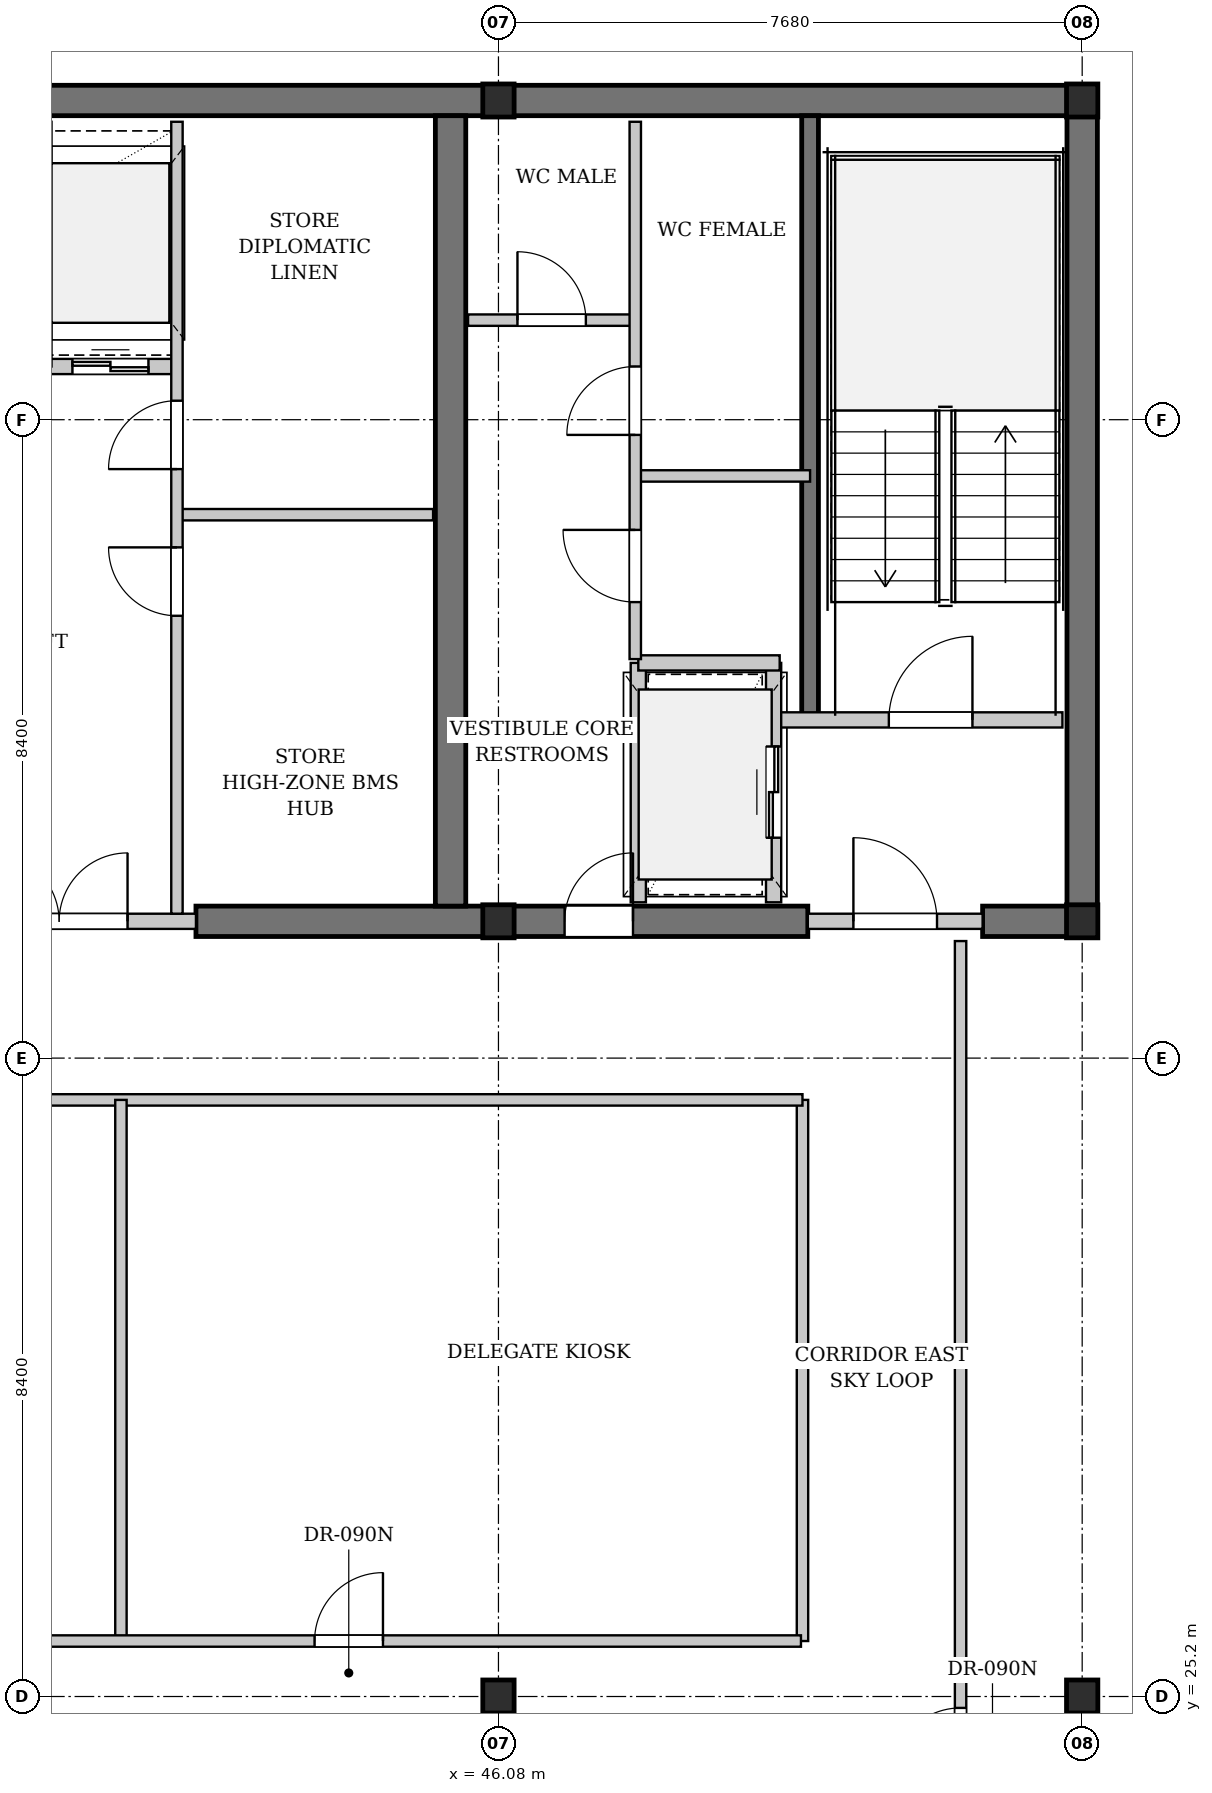
"""IFC4 building model, lengths in metres.
Left out: names, types, materials, properties, quantities, classifications, styles, units other than length and angle.
Written with IfcOpenShell. Run it as: python <this file> out.ifc"""

import sys

from ifc_helpers import new_model, si_unit, direction, frame, frame_2d, origin, origin_2d, place, context, subcontext, project, spatial, rectangle, i_section, extrude, element, fill, save


model = new_model("IFC4")
c1 = context("Model", 3, precision=1e-05, world=origin(), true_north=direction((0.0, 1.0)))
c2 = subcontext(c1, "Body", "Model", "MODEL_VIEW")
j1 = project(units=[si_unit("LENGTHUNIT", "METRE"), si_unit("PLANEANGLEUNIT", "RADIAN")], contexts=[c1])
p1 = place(None, origin())
s1 = spatial("IfcSite", under=j1, at=p1, CompositionType="ELEMENT")
p2 = place(p1, origin())
s2 = spatial("IfcBuilding", under=s1, at=p2, CompositionType="ELEMENT")
p3 = place(p2, frame((0.0, 0.0, 221.0)))
s3 = spatial("IfcBuildingStorey", under=s2, at=p3, CompositionType="ELEMENT", Elevation=221.0)
p4 = place(p3, frame((22.84, 46.2, 0.0), z_axis=(0.0, 0.0, 1.0), x_axis=(1.0, 0.0, 0.0)))
e1 = element("IfcWall", 1, at=p4, inside=s3, PredefinedType="SHEAR", context=c2, shape_type="SweptSolid", body=[
    extrude(rectangle(XDim=31.12, YDim=0.4, at=frame_2d((15.56, 0.0))), origin(), (0.0, 0.0, 1.0), 3.08),
])
p5 = place(p3, frame((42.1, 35.4, 0.0), z_axis=(0.0, 0.0, 1.0), x_axis=(1.0, 0.0, 0.0)))
e2 = element("IfcWall", 2, at=p5, inside=s3, PredefinedType="SHEAR", context=c2, shape_type="SweptSolid", body=[
    extrude(rectangle(XDim=8.05, YDim=0.4, at=frame_2d((4.025, 0.0))), origin(), (0.0, 0.0, 1.0), 3.08),
])
p6 = place(p5, frame((4.85, 0.0, 0.0)))
e3 = element("IfcOpeningElement", 3, at=p6, cuts=e2, PredefinedType="OPENING", context=c2, shape_type="SweptSolid", body=[
    extrude(rectangle(XDim=0.9, YDim=2.15, at=frame_2d((0.45, 1.075))), frame((0.0, 0.21, 0.0), z_axis=(0.0, -1.0, 0.0), x_axis=(1.0, 0.0, 0.0)), (0.0, 0.0, 1.0), 0.42),
])
p7 = place(p3, frame((52.45, 35.4, 0.0), z_axis=(0.0, 0.0, 1.0), x_axis=(1.0, 0.0, 0.0)))
e4 = element("IfcWall", 4, at=p7, inside=s3, PredefinedType="SHEAR", context=c2, shape_type="SweptSolid", body=[
    extrude(rectangle(XDim=1.51, YDim=0.4, at=frame_2d((0.755, 0.0))), origin(), (0.0, 0.0, 1.0), 3.08),
])
for number, where, z_axis, x_axis in (
    (5, (45.45, 35.6, 0.0), (0.0, 0.0, 1.0), (0.0, 1.0, 0.0)),
    (6, (53.76, 35.6, 0.0), (0.0, 0.0, 1.0), (0.0, 1.0, 0.0)),
):
    element("IfcWall", number, at=place(p3, frame(where, z_axis=z_axis, x_axis=x_axis)), inside=s3, PredefinedType="SHEAR", context=c2, shape_type="SweptSolid", body=[
        extrude(rectangle(XDim=10.4, YDim=0.4, at=frame_2d((5.2, 0.0))), origin(), (0.0, 0.0, 1.0), 3.08),
    ])
p8 = place(p3, frame((50.18, 38.05, 0.0), z_axis=(0.0, 0.0, 1.0), x_axis=(0.0, 1.0, 0.0)))
e7 = element("IfcWall", 7, at=p8, inside=s3, PredefinedType="SHEAR", context=c2, shape_type="SweptSolid", body=[
    extrude(rectangle(XDim=7.95, YDim=0.22, at=frame_2d((3.975, 0.0))), origin(), (0.0, 0.0, 1.0), 3.08),
])
for number, where, z_axis, x_axis in (
    (8, (46.08, 35.4, 0.0), (0.0, 0.0, 1.0), (1.0, 0.0, 0.0)),
    (9, (46.08, 46.2, 0.0), (0.0, 0.0, 1.0), (1.0, 0.0, 0.0)),
    (10, (46.08, 25.2, 0.0), (0.0, 0.0, 1.0), (1.0, 0.0, 0.0)),
    (11, (53.76, 35.4, 0.0), (0.0, 0.0, 1.0), (1.0, 0.0, 0.0)),
    (12, (53.76, 46.2, 0.0), (0.0, 0.0, 1.0), (1.0, 0.0, 0.0)),
    (13, (53.76, 25.2, 0.0), (0.0, 0.0, 1.0), (1.0, 0.0, 0.0)),
):
    element("IfcColumn", number, at=place(p3, frame(where, z_axis=z_axis, x_axis=x_axis)), inside=s3, PredefinedType="COLUMN", context=c2, shape_type="SweptSolid", body=[
        extrude(i_section(OverallWidth=0.412, OverallDepth=0.435, WebThickness=0.036, FlangeThickness=0.058, FilletRadius=0.015, at=origin_2d()), origin(), (0.0, 0.0, 1.0), 3.3),
    ])
p9 = place(p3, frame((35.6, 35.4, 0.0), z_axis=(0.0, 0.0, 1.0), x_axis=(1.0, 0.0, 0.0)))
e14 = element("IfcWall", 14, at=p9, inside=s3, PredefinedType="PARTITIONING", context=c2, shape_type="SweptSolid", body=[
    extrude(rectangle(XDim=6.5, YDim=0.2, at=frame_2d((3.25, 0.0))), origin(), (0.0, 0.0, 1.0), 2.313),
])
p10 = place(p9, frame((3.8, 0.0, 0.0)))
e15 = element("IfcOpeningElement", 15, at=p10, cuts=e14, PredefinedType="OPENING", context=c2, shape_type="SweptSolid", body=[
    extrude(rectangle(XDim=1.8, YDim=2.3, at=frame_2d((0.9, 1.15))), frame((0.0, 0.11, 0.0), z_axis=(0.0, -1.0, 0.0), x_axis=(1.0, 0.0, 0.0)), (0.0, 0.0, 1.0), 0.22),
])
p11 = place(p3, frame((36.6, 42.7, 0.0), z_axis=(0.0, 0.0, 1.0), x_axis=(1.0, 0.0, 0.0)))
e16 = element("IfcWall", 16, at=p11, inside=s3, PredefinedType="PARTITIONING", context=c2, shape_type="SweptSolid", body=[
    extrude(rectangle(XDim=5.25, YDim=0.2, at=frame_2d((2.625, 0.0))), origin(), (0.0, 0.0, 1.0), 3.08),
])
p12 = place(p11, frame((0.375, 0.0, 0.0)))
e17 = element("IfcOpeningElement", 17, at=p12, cuts=e16, PredefinedType="OPENING", context=c2, shape_type="SweptSolid", body=[
    extrude(rectangle(XDim=1.0, YDim=2.2, at=frame_2d((0.5, 1.1))), frame((0.0, 0.11, 0.0), z_axis=(0.0, -1.0, 0.0), x_axis=(1.0, 0.0, 0.0)), (0.0, 0.0, 1.0), 0.22),
])
p13 = place(p11, frame((2.125, 0.0, 0.0)))
e18 = element("IfcOpeningElement", 18, at=p13, cuts=e16, PredefinedType="OPENING", context=c2, shape_type="SweptSolid", body=[
    extrude(rectangle(XDim=1.0, YDim=2.2, at=frame_2d((0.5, 1.1))), frame((0.0, 0.11, 0.0), z_axis=(0.0, -1.0, 0.0), x_axis=(1.0, 0.0, 0.0)), (0.0, 0.0, 1.0), 0.22),
])
p14 = place(p11, frame((3.875, 0.0, 0.0)))
e19 = element("IfcOpeningElement", 19, at=p14, cuts=e16, PredefinedType="OPENING", context=c2, shape_type="SweptSolid", body=[
    extrude(rectangle(XDim=1.0, YDim=2.2, at=frame_2d((0.5, 1.1))), frame((0.0, 0.11, 0.0), z_axis=(0.0, -1.0, 0.0), x_axis=(1.0, 0.0, 0.0)), (0.0, 0.0, 1.0), 0.22),
])
p15 = place(p3, frame((41.85, 40.75, 0.0), z_axis=(0.0, 0.0, 1.0), x_axis=(1.0, 0.0, 0.0)))
e20 = element("IfcWall", 20, at=p15, inside=s3, PredefinedType="PARTITIONING", context=c2, shape_type="SweptSolid", body=[
    extrude(rectangle(XDim=3.37, YDim=0.15, at=frame_2d((1.685, 0.0))), origin(), (0.0, 0.0, 1.0), 3.08),
])
p16 = place(p3, frame((41.85, 35.5, 0.0), z_axis=(0.0, 0.0, 1.0), x_axis=(0.0, 1.0, 0.0)))
e21 = element("IfcWall", 21, at=p16, inside=s3, PredefinedType="PARTITIONING", context=c2, shape_type="SweptSolid", body=[
    extrude(rectangle(XDim=10.42, YDim=0.15, at=frame_2d((5.21, 0.0))), origin(), (0.0, 0.0, 1.0), 3.08),
])
p17 = place(p16, frame((3.92, 0.0, 0.0)))
e22 = element("IfcOpeningElement", 22, at=p17, cuts=e21, PredefinedType="OPENING", context=c2, shape_type="SweptSolid", body=[
    extrude(rectangle(XDim=0.9, YDim=2.15, at=frame_2d((0.45, 1.075))), frame((0.0, 0.085, 0.0), z_axis=(0.0, -1.0, 0.0), x_axis=(1.0, 0.0, 0.0)), (0.0, 0.0, 1.0), 0.17),
])
p18 = place(p16, frame((5.85, 0.0, 0.0)))
e23 = element("IfcOpeningElement", 23, at=p18, cuts=e21, PredefinedType="OPENING", context=c2, shape_type="SweptSolid", body=[
    extrude(rectangle(XDim=0.9, YDim=2.15, at=frame_2d((0.45, 1.075))), frame((0.0, 0.085, 0.0), z_axis=(0.0, -1.0, 0.0), x_axis=(1.0, 0.0, 0.0)), (0.0, 0.0, 1.0), 0.17),
])
p19 = place(p3, frame((49.78, 38.05, 0.0), z_axis=(0.0, 0.0, 1.0), x_axis=(1.0, 0.0, 0.0)))
e24 = element("IfcWall", 24, at=p19, inside=s3, PredefinedType="PARTITIONING", context=c2, shape_type="SweptSolid", body=[
    extrude(rectangle(XDim=3.72, YDim=0.2, at=frame_2d((1.86, 0.0))), origin(), (0.0, 0.0, 1.0), 3.08),
])
p20 = place(p19, frame((1.436, 0.0, 0.0)))
e25 = element("IfcOpeningElement", 25, at=p20, cuts=e24, PredefinedType="OPENING", context=c2, shape_type="SweptSolid", body=[
    extrude(rectangle(XDim=1.1, YDim=2.15, at=frame_2d((0.55, 1.075))), frame((0.0, 0.11, 0.0), z_axis=(0.0, -1.0, 0.0), x_axis=(1.0, 0.0, 0.0)), (0.0, 0.0, 1.0), 0.22),
])
p21 = place(p3, frame((50.15, 35.4, 0.0), z_axis=(0.0, 0.0, 1.0), x_axis=(1.0, 0.0, 0.0)))
e26 = element("IfcWall", 26, at=p21, inside=s3, PredefinedType="PARTITIONING", context=c2, shape_type="SweptSolid", body=[
    extrude(rectangle(XDim=2.3, YDim=0.2, at=frame_2d((1.15, 0.0))), origin(), (0.0, 0.0, 1.0), 2.313),
])
p22 = place(p21, frame((0.6, 0.0, 0.0)))
e27 = element("IfcOpeningElement", 27, at=p22, cuts=e26, PredefinedType="OPENING", context=c2, shape_type="SweptSolid", body=[
    extrude(rectangle(XDim=1.1, YDim=2.15, at=frame_2d((0.55, 1.075))), frame((0.0, 0.11, 0.0), z_axis=(0.0, -1.0, 0.0), x_axis=(1.0, 0.0, 0.0)), (0.0, 0.0, 1.0), 0.22),
])
p23 = place(p3, frame((49.7, 35.65, 0.0), z_axis=(0.0, 0.0, 1.0), x_axis=(0.0, 1.0, 0.0)))
e28 = element("IfcWall", 28, at=p23, inside=s3, PredefinedType="PARTITIONING", context=c2, shape_type="SweptSolid", body=[
    extrude(rectangle(XDim=3.15, YDim=0.2, at=frame_2d((1.575, 0.0))), origin(), (0.0, 0.0, 1.0), 3.08),
])
p24 = place(p23, frame((0.85, 0.0, 0.0)))
e29 = element("IfcOpeningElement", 29, at=p24, cuts=e28, PredefinedType="OPENING", context=c2, shape_type="SweptSolid", body=[
    extrude(rectangle(XDim=1.2, YDim=2.2, at=frame_2d((0.6, 1.1))), frame((0.0, 0.11, 0.0), z_axis=(0.0, -1.0, 0.0), x_axis=(1.0, 0.0, 0.0)), (0.0, 0.0, 1.0), 0.22),
])
p25 = place(p3, frame((47.92, 35.65, 0.0), z_axis=(0.0, 0.0, 1.0), x_axis=(0.0, 1.0, 0.0)))
e30 = element("IfcWall", 30, at=p25, inside=s3, PredefinedType="PARTITIONING", context=c2, shape_type="SweptSolid", body=[
    extrude(rectangle(XDim=3.15, YDim=0.2, at=frame_2d((1.575, 0.0))), origin(), (0.0, 0.0, 1.0), 3.08),
])
p26 = place(p3, frame((47.92, 38.8, 0.0), z_axis=(0.0, 0.0, 1.0), x_axis=(1.0, 0.0, 0.0)))
e31 = element("IfcWall", 31, at=p26, inside=s3, PredefinedType="PARTITIONING", context=c2, shape_type="SweptSolid", body=[
    extrude(rectangle(XDim=1.86, YDim=0.2, at=frame_2d((0.93, 0.0))), origin(), (0.0, 0.0, 1.0), 3.08),
])
p27 = place(p3, frame((45.68, 43.31, 0.0), z_axis=(0.0, 0.0, 1.0), x_axis=(1.0, 0.0, 0.0)))
e32 = element("IfcWall", 32, at=p27, inside=s3, PredefinedType="PARTITIONING", context=c2, shape_type="SweptSolid", body=[
    extrude(rectangle(XDim=2.2, YDim=0.15, at=frame_2d((1.1, 0.0))), origin(), (0.0, 0.0, 1.0), 3.08),
])
p28 = place(p27, frame((0.65, 0.0, 0.0)))
e33 = element("IfcOpeningElement", 33, at=p28, cuts=e32, PredefinedType="OPENING", context=c2, shape_type="SweptSolid", body=[
    extrude(rectangle(XDim=0.9, YDim=2.15, at=frame_2d((0.45, 1.075))), frame((0.0, 0.085, 0.0), z_axis=(0.0, -1.0, 0.0), x_axis=(1.0, 0.0, 0.0)), (0.0, 0.0, 1.0), 0.17),
])
p29 = place(p3, frame((47.88, 41.26, 0.0), z_axis=(0.0, 0.0, 1.0), x_axis=(1.0, 0.0, 0.0)))
e34 = element("IfcWall", 34, at=p29, inside=s3, PredefinedType="PARTITIONING", context=c2, shape_type="SweptSolid", body=[
    extrude(rectangle(XDim=2.3, YDim=0.15, at=frame_2d((1.15, 0.0))), origin(), (0.0, 0.0, 1.0), 3.08),
])
p30 = place(p3, frame((47.88, 38.85, 0.0), z_axis=(0.0, 0.0, 1.0), x_axis=(0.0, 1.0, 0.0)))
e35 = element("IfcWall", 35, at=p30, inside=s3, PredefinedType="PARTITIONING", context=c2, shape_type="SweptSolid", body=[
    extrude(rectangle(XDim=7.07, YDim=0.15, at=frame_2d((3.535, 0.0))), origin(), (0.0, 0.0, 1.0), 3.08),
])
p31 = place(p30, frame((0.75, 0.0, 0.0)))
e36 = element("IfcOpeningElement", 36, at=p31, cuts=e35, PredefinedType="OPENING", context=c2, shape_type="SweptSolid", body=[
    extrude(rectangle(XDim=0.95, YDim=2.15, at=frame_2d((0.475, 1.075))), frame((0.0, 0.085, 0.0), z_axis=(0.0, -1.0, 0.0), x_axis=(1.0, 0.0, 0.0)), (0.0, 0.0, 1.0), 0.17),
])
p32 = place(p30, frame((2.95, 0.0, 0.0)))
e37 = element("IfcOpeningElement", 37, at=p32, cuts=e35, PredefinedType="OPENING", context=c2, shape_type="SweptSolid", body=[
    extrude(rectangle(XDim=0.9, YDim=2.15, at=frame_2d((0.45, 1.075))), frame((0.0, 0.085, 0.0), z_axis=(0.0, -1.0, 0.0), x_axis=(1.0, 0.0, 0.0)), (0.0, 0.0, 1.0), 0.17),
])
p33 = place(p3, frame((52.16, 23.85, 0.0), z_axis=(0.0, 0.0, 1.0), x_axis=(0.0, 1.0, 0.0)))
e38 = element("IfcWall", 38, at=p33, inside=s3, PredefinedType="PARTITIONING", context=c2, shape_type="SweptSolid", body=[
    extrude(rectangle(XDim=11.29, YDim=0.15, at=frame_2d((5.645, 0.0))), origin(), (0.0, 0.0, 1.0), 3.08),
])
p34 = place(p33, frame((0.3, 0.0, 0.0)))
e39 = element("IfcOpeningElement", 39, at=p34, cuts=e38, PredefinedType="OPENING", context=c2, shape_type="SweptSolid", body=[
    extrude(rectangle(XDim=0.9, YDim=2.15, at=frame_2d((0.45, 1.075))), frame((0.0, 0.085, 0.0), z_axis=(0.0, -1.0, 0.0), x_axis=(1.0, 0.0, 0.0)), (0.0, 0.0, 1.0), 0.17),
])
p35 = place(p3, frame((50.08, 25.93, 0.0), z_axis=(0.0, 0.0, 1.0), x_axis=(0.0, 1.0, 0.0)))
e40 = element("IfcWall", 40, at=p35, inside=s3, PredefinedType="PARTITIONING", context=c2, shape_type="SweptSolid", body=[
    extrude(rectangle(XDim=7.12, YDim=0.15, at=frame_2d((3.56, 0.0))), origin(), (0.0, 0.0, 1.0), 3.08),
])
p36 = place(p3, frame((35.62, 33.05, 0.0), z_axis=(0.0, 0.0, 1.0), x_axis=(1.0, 0.0, 0.0)))
e41 = element("IfcWall", 41, at=p36, inside=s3, PredefinedType="PARTITIONING", context=c2, shape_type="SweptSolid", body=[
    extrude(rectangle(XDim=14.46, YDim=0.15, at=frame_2d((7.23, 0.0))), origin(), (0.0, 0.0, 1.0), 3.08),
])
p37 = place(p3, frame((41.113, 25.93, 0.0), z_axis=(0.0, 0.0, 1.0), x_axis=(0.0, 1.0, 0.0)))
e42 = element("IfcWall", 42, at=p37, inside=s3, PredefinedType="PARTITIONING", context=c2, shape_type="SweptSolid", body=[
    extrude(rectangle(XDim=7.12, YDim=0.15, at=frame_2d((3.56, 0.0))), origin(), (0.0, 0.0, 1.0), 3.08),
])
p38 = place(p3, frame((35.63, 25.93, 0.0), z_axis=(0.0, 0.0, 1.0), x_axis=(1.0, 0.0, 0.0)))
e43 = element("IfcWall", 43, at=p38, inside=s3, PredefinedType="PARTITIONING", context=c2, shape_type="SweptSolid", body=[
    extrude(rectangle(XDim=14.43, YDim=0.15, at=frame_2d((7.215, 0.0))), origin(), (0.0, 0.0, 1.0), 3.08),
])
p39 = place(p38, frame((0.65, 0.0, 0.0)))
e44 = element("IfcOpeningElement", 44, at=p39, cuts=e43, PredefinedType="OPENING", context=c2, shape_type="SweptSolid", body=[
    extrude(rectangle(XDim=0.9, YDim=2.15, at=frame_2d((0.45, 1.075))), frame((0.0, 0.085, 0.0), z_axis=(0.0, -1.0, 0.0), x_axis=(1.0, 0.0, 0.0)), (0.0, 0.0, 1.0), 0.17),
])
p40 = place(p38, frame((8.031, 0.0, 0.0)))
e45 = element("IfcOpeningElement", 45, at=p40, cuts=e43, PredefinedType="OPENING", context=c2, shape_type="SweptSolid", body=[
    extrude(rectangle(XDim=0.9, YDim=2.15, at=frame_2d((0.45, 1.075))), frame((0.0, 0.085, 0.0), z_axis=(0.0, -1.0, 0.0), x_axis=(1.0, 0.0, 0.0)), (0.0, 0.0, 1.0), 0.17),
])
p41 = place(p10, origin())
e46 = element("IfcDoor", 46, at=p41, inside=s3, OperationType="DOUBLE_DOOR_SINGLE_SWING", PredefinedType="DOOR", context=c2, shape_type="SweptSolid", body=[
    extrude(rectangle(XDim=1.8, YDim=2.3, at=frame_2d((0.9, 1.15))), frame((0.0, 0.025, 0.0), z_axis=(0.0, -1.0, 0.0), x_axis=(1.0, 0.0, 0.0)), (0.0, 0.0, 1.0), 0.05),
])
fill(e15, e46)
p42 = place(p14, origin())
e47 = element("IfcDoor", 47, at=p42, inside=s3, OperationType="DOUBLE_DOOR_SLIDING", PredefinedType="DOOR", context=c2, shape_type="SweptSolid", body=[
    extrude(rectangle(XDim=1.0, YDim=2.2, at=frame_2d((0.5, 1.1))), frame((0.0, 0.025, 0.0), z_axis=(0.0, -1.0, 0.0), x_axis=(1.0, 0.0, 0.0)), (0.0, 0.0, 1.0), 0.05),
])
fill(e19, e47)
p43 = place(p17, origin())
e48 = element("IfcDoor", 48, at=p43, inside=s3, OperationType="SINGLE_SWING_RIGHT", PredefinedType="DOOR", context=c2, shape_type="SweptSolid", body=[
    extrude(rectangle(XDim=0.9, YDim=2.15, at=frame_2d((0.45, 1.075))), frame((0.0, 0.025, 0.0), z_axis=(0.0, -1.0, 0.0), x_axis=(1.0, 0.0, 0.0)), (0.0, 0.0, 1.0), 0.05),
])
fill(e22, e48)
p44 = place(p18, origin())
e49 = element("IfcDoor", 49, at=p44, inside=s3, OperationType="SINGLE_SWING_LEFT", PredefinedType="DOOR", context=c2, shape_type="SweptSolid", body=[
    extrude(rectangle(XDim=0.9, YDim=2.15, at=frame_2d((0.45, 1.075))), frame((0.0, 0.025, 0.0), z_axis=(0.0, -1.0, 0.0), x_axis=(1.0, 0.0, 0.0)), (0.0, 0.0, 1.0), 0.05),
])
fill(e23, e49)
p45 = place(p20, origin())
e50 = element("IfcDoor", 50, at=p45, inside=s3, OperationType="SINGLE_SWING_RIGHT", PredefinedType="DOOR", context=c2, shape_type="SweptSolid", body=[
    extrude(rectangle(XDim=1.1, YDim=2.15, at=frame_2d((0.55, 1.075))), frame((0.0, 0.025, 0.0), z_axis=(0.0, -1.0, 0.0), x_axis=(1.0, 0.0, 0.0)), (0.0, 0.0, 1.0), 0.05),
])
fill(e25, e50)
p46 = place(p22, origin())
e51 = element("IfcDoor", 51, at=p46, inside=s3, OperationType="SINGLE_SWING_LEFT", PredefinedType="DOOR", context=c2, shape_type="SweptSolid", body=[
    extrude(rectangle(XDim=1.1, YDim=2.15, at=frame_2d((0.55, 1.075))), frame((0.0, 0.025, 0.0), z_axis=(0.0, -1.0, 0.0), x_axis=(1.0, 0.0, 0.0)), (0.0, 0.0, 1.0), 0.05),
])
fill(e27, e51)
p47 = place(p24, origin())
e52 = element("IfcDoor", 52, at=p47, inside=s3, OperationType="DOUBLE_DOOR_SLIDING", PredefinedType="DOOR", context=c2, shape_type="SweptSolid", body=[
    extrude(rectangle(XDim=1.2, YDim=2.2, at=frame_2d((0.6, 1.1))), frame((0.0, 0.025, 0.0), z_axis=(0.0, -1.0, 0.0), x_axis=(1.0, 0.0, 0.0)), (0.0, 0.0, 1.0), 0.05),
])
fill(e29, e52)
p48 = place(p28, origin())
e53 = element("IfcDoor", 53, at=p48, inside=s3, OperationType="SINGLE_SWING_LEFT", PredefinedType="DOOR", context=c2, shape_type="SweptSolid", body=[
    extrude(rectangle(XDim=0.9, YDim=2.15, at=frame_2d((0.45, 1.075))), frame((0.0, 0.025, 0.0), z_axis=(0.0, -1.0, 0.0), x_axis=(1.0, 0.0, 0.0)), (0.0, 0.0, 1.0), 0.05),
])
fill(e33, e53)
p49 = place(p31, origin())
e54 = element("IfcDoor", 54, at=p49, inside=s3, OperationType="SINGLE_SWING_RIGHT", PredefinedType="DOOR", context=c2, shape_type="SweptSolid", body=[
    extrude(rectangle(XDim=0.95, YDim=2.15, at=frame_2d((0.475, 1.075))), frame((0.0, 0.025, 0.0), z_axis=(0.0, -1.0, 0.0), x_axis=(1.0, 0.0, 0.0)), (0.0, 0.0, 1.0), 0.05),
])
fill(e36, e54)
p50 = place(p32, origin())
e55 = element("IfcDoor", 55, at=p50, inside=s3, OperationType="SINGLE_SWING_LEFT", PredefinedType="DOOR", context=c2, shape_type="SweptSolid", body=[
    extrude(rectangle(XDim=0.9, YDim=2.15, at=frame_2d((0.45, 1.075))), frame((0.0, 0.025, 0.0), z_axis=(0.0, -1.0, 0.0), x_axis=(1.0, 0.0, 0.0)), (0.0, 0.0, 1.0), 0.05),
])
fill(e37, e55)
p51 = place(p34, origin())
e56 = element("IfcDoor", 56, at=p51, inside=s3, OperationType="SINGLE_SWING_LEFT", PredefinedType="DOOR", context=c2, shape_type="SweptSolid", body=[
    extrude(rectangle(XDim=0.9, YDim=2.15, at=frame_2d((0.45, 1.075))), frame((0.0, 0.025, 0.0), z_axis=(0.0, -1.0, 0.0), x_axis=(1.0, 0.0, 0.0)), (0.0, 0.0, 1.0), 0.05),
])
fill(e39, e56)
p52 = place(p40, origin())
e57 = element("IfcDoor", 57, at=p52, inside=s3, OperationType="SINGLE_SWING_RIGHT", PredefinedType="DOOR", context=c2, shape_type="SweptSolid", body=[
    extrude(rectangle(XDim=0.9, YDim=2.15, at=frame_2d((0.45, 1.075))), frame((0.0, 0.025, 0.0), z_axis=(0.0, -1.0, 0.0), x_axis=(1.0, 0.0, 0.0)), (0.0, 0.0, 1.0), 0.05),
])
fill(e45, e57)
p53 = place(p6, origin())
e58 = element("IfcDoor", 58, at=p53, inside=s3, OperationType="SINGLE_SWING_RIGHT", PredefinedType="DOOR", context=c2, shape_type="SweptSolid", body=[
    extrude(rectangle(XDim=0.9, YDim=2.15, at=frame_2d((0.45, 1.075))), frame((0.0, 0.025, 0.0), z_axis=(0.0, -1.0, 0.0), x_axis=(1.0, 0.0, 0.0)), (0.0, 0.0, 1.0), 0.05),
])
fill(e3, e58)
save(model, sys.argv[1])
